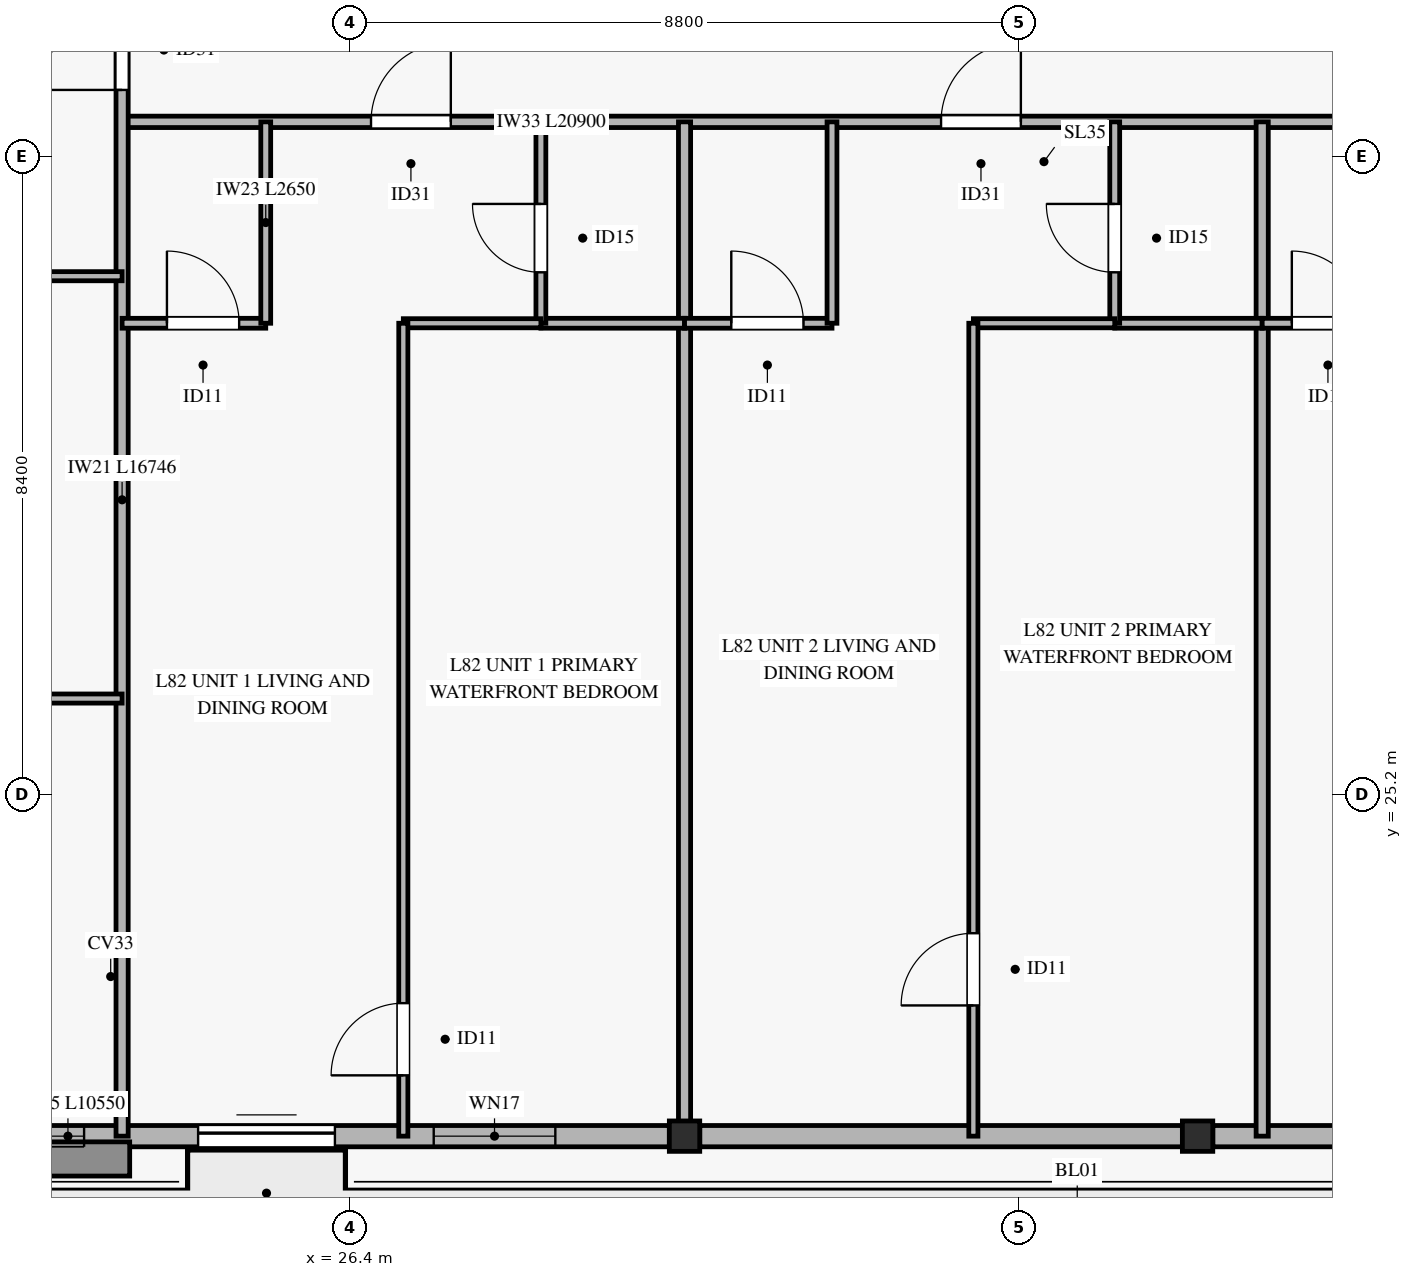
"""IFC4 building model, lengths in metres.
Left out: names, types, materials, properties, quantities, classifications, styles, units other than length and angle.
Written with IfcOpenShell. Run it as: python <this file> out.ifc"""

import sys

from ifc_helpers import new_model, si_unit, direction, frame, frame_2d, origin, origin_2d, place, context, subcontext, project, spatial, rectangle, hollow_rectangle, extrude, source, transform, mapped, element, fill, save


model = new_model("IFC4")
c1 = context("Model", 3, precision=1e-05, world=origin(), true_north=direction((0.0, 1.0)))
c2 = subcontext(c1, "Body", "Model", "MODEL_VIEW")
j1 = project(units=[si_unit("LENGTHUNIT", "METRE"), si_unit("PLANEANGLEUNIT", "RADIAN")], contexts=[c1])
p1 = place(None, origin())
s1 = spatial("IfcSite", under=j1, at=p1, CompositionType="ELEMENT")
p2 = place(p1, origin())
s2 = spatial("IfcBuilding", under=s1, at=p2, CompositionType="ELEMENT")
p3 = place(p2, frame((0.0, 0.0, 317.6)))
s3 = spatial("IfcBuildingStorey", under=s2, at=p3, CompositionType="ELEMENT", Elevation=317.6)
m1 = source(origin(), c2, "Body", "SweptSolid", [
    extrude(hollow_rectangle(XDim=0.4, YDim=0.4, WallThickness=0.02, at=origin_2d()), origin(), (0.0, 0.0, 1.0), 3.185),
])
for number, where, z_axis, x_axis in (
    (1, (30.8, 20.704, 0.0), (0.0, 0.0, 1.0), (1.0, 0.0, 0.0)),
    (2, (37.55, 20.704, 0.0), (0.0, 0.0, 1.0), (1.0, 0.0, 0.0)),
):
    element("IfcColumn", number, at=place(p3, frame(where, z_axis=z_axis, x_axis=x_axis)), inside=s3, PredefinedType="COLUMN", context=c2, shape_type="MappedRepresentation", body=[
        mapped(m1, transform((0.0, 0.0, 0.0), x_axis=(1.0, 0.0, 0.0), y_axis=(0.0, 1.0, 0.0), z_axis=(0.0, 0.0, 1.0), scale=1.0)),
    ])
p4 = place(p3, frame((20.05, 20.704, 0.0), z_axis=(0.0, 0.0, 1.0), x_axis=(1.0, 0.0, 0.0)))
e3 = element("IfcWall", 3, at=p4, inside=s3, PredefinedType="SOLIDWALL", context=c2, shape_type="SweptSolid", body=[
    extrude(rectangle(XDim=10.55, YDim=0.28, at=frame_2d((5.275, 0.0))), origin(), (0.0, 0.0, 1.0), 2.815),
])
p5 = place(p4, frame((4.35, 0.0, 0.0)))
e4 = element("IfcOpeningElement", 4, at=p5, cuts=e3, PredefinedType="OPENING", context=c2, shape_type="SweptSolid", body=[
    extrude(rectangle(XDim=1.8, YDim=2.25, at=frame_2d((0.9, 1.125))), frame((0.0, 0.15, 0.0), z_axis=(0.0, -1.0, 0.0), x_axis=(1.0, 0.0, 0.0)), (0.0, 0.0, 1.0), 0.3),
])
p6 = place(p4, frame((0.65, 0.0, 0.45)))
e5 = element("IfcOpeningElement", 5, at=p6, cuts=e3, PredefinedType="OPENING", context=c2, shape_type="SweptSolid", body=[
    extrude(rectangle(XDim=2.2, YDim=2.1, at=frame_2d((1.1, 1.05))), frame((0.0, 0.15, 0.0), z_axis=(0.0, -1.0, 0.0), x_axis=(1.0, 0.0, 0.0)), (0.0, 0.0, 1.0), 0.3),
])
p7 = place(p4, frame((7.45, 0.0, 0.45)))
e6 = element("IfcOpeningElement", 6, at=p7, cuts=e3, PredefinedType="OPENING", context=c2, shape_type="SweptSolid", body=[
    extrude(rectangle(XDim=1.6, YDim=2.0, at=frame_2d((0.8, 1.0))), frame((0.0, 0.15, 0.0), z_axis=(0.0, -1.0, 0.0), x_axis=(1.0, 0.0, 0.0)), (0.0, 0.0, 1.0), 0.3),
])
for number, where, z_axis, x_axis in (
    (7, (31.0, 20.704, 0.0), (0.0, 0.0, 1.0), (1.0, 0.0, 0.0)),
    (8, (37.75, 20.704, 0.0), (0.0, 0.0, 1.0), (1.0, 0.0, 0.0)),
):
    element("IfcWall", number, at=place(p3, frame(where, z_axis=z_axis, x_axis=x_axis)), inside=s3, PredefinedType="SOLIDWALL", context=c2, shape_type="SweptSolid", body=[
        extrude(rectangle(XDim=6.35, YDim=0.28, at=frame_2d((3.175, 0.0))), origin(), (0.0, 0.0, 1.0), 2.815),
    ])
p8 = place(p3, frame((23.4, 34.05, 0.0), z_axis=(0.0, 0.0, 1.0), x_axis=(1.0, 0.0, 0.0)))
e9 = element("IfcWall", 9, at=p8, inside=s3, PredefinedType="PARTITIONING", context=c2, shape_type="SweptSolid", body=[
    extrude(rectangle(XDim=20.9, YDim=0.15, at=frame_2d((10.45, 0.0))), origin(), (0.0, 0.0, 1.0), 2.47),
])
p9 = place(p8, frame((3.275, 0.0, 0.0)))
e10 = element("IfcOpeningElement", 10, at=p9, cuts=e9, PredefinedType="OPENING", context=c2, shape_type="SweptSolid", body=[
    extrude(rectangle(XDim=1.05, YDim=2.15, at=frame_2d((0.525, 1.075))), frame((0.0, 0.085, 0.0), z_axis=(0.0, -1.0, 0.0), x_axis=(1.0, 0.0, 0.0)), (0.0, 0.0, 1.0), 0.17),
])
p10 = place(p8, frame((10.775, 0.0, 0.0)))
e11 = element("IfcOpeningElement", 11, at=p10, cuts=e9, PredefinedType="OPENING", context=c2, shape_type="SweptSolid", body=[
    extrude(rectangle(XDim=1.05, YDim=2.15, at=frame_2d((0.525, 1.075))), frame((0.0, 0.085, 0.0), z_axis=(0.0, -1.0, 0.0), x_axis=(1.0, 0.0, 0.0)), (0.0, 0.0, 1.0), 0.17),
])
p11 = place(p8, frame((17.525, 0.0, 0.0)))
e12 = element("IfcOpeningElement", 12, at=p11, cuts=e9, PredefinedType="OPENING", context=c2, shape_type="SweptSolid", body=[
    extrude(rectangle(XDim=1.05, YDim=2.15, at=frame_2d((0.525, 1.075))), frame((0.0, 0.085, 0.0), z_axis=(0.0, -1.0, 0.0), x_axis=(1.0, 0.0, 0.0)), (0.0, 0.0, 1.0), 0.17),
])
p12 = place(p3, frame((23.4, 20.704, 0.0), z_axis=(0.0, 0.0, 1.0), x_axis=(0.0, 1.0, 0.0)))
e13 = element("IfcWall", 13, at=p12, inside=s3, PredefinedType="PARTITIONING", context=c2, shape_type="SweptSolid", body=[
    extrude(rectangle(XDim=16.746, YDim=0.16, at=frame_2d((8.373, 0.0))), origin(), (0.0, 0.0, 1.0), 2.77),
])
p13 = place(p12, frame((13.766, 0.0, 0.0)))
e14 = element("IfcOpeningElement", 14, at=p13, cuts=e13, PredefinedType="OPENING", context=c2, shape_type="SweptSolid", body=[
    extrude(rectangle(XDim=1.05, YDim=2.15, at=frame_2d((0.525, 1.075))), frame((0.0, 0.09, 0.0), z_axis=(0.0, -1.0, 0.0), x_axis=(1.0, 0.0, 0.0)), (0.0, 0.0, 1.0), 0.18),
])
p14 = place(p3, frame((30.8, 20.704, 0.0), z_axis=(0.0, 0.0, 1.0), x_axis=(0.0, 1.0, 0.0)))
e15 = element("IfcWall", 15, at=p14, inside=s3, PredefinedType="PARTITIONING", context=c2, shape_type="SweptSolid", body=[
    extrude(rectangle(XDim=13.346, YDim=0.16, at=frame_2d((6.673, 0.0))), origin(), (0.0, 0.0, 1.0), 2.47),
])
p15 = place(p3, frame((38.4, 20.704, 0.0), z_axis=(0.0, 0.0, 1.0), x_axis=(0.0, 1.0, 0.0)))
e16 = element("IfcWall", 16, at=p15, inside=s3, PredefinedType="PARTITIONING", context=c2, shape_type="SweptSolid", body=[
    extrude(rectangle(XDim=13.346, YDim=0.16, at=frame_2d((6.673, 0.0))), origin(), (0.0, 0.0, 1.0), 2.77),
])
p16 = place(p3, frame((10.855, 26.462, 0.0), z_axis=(0.0, 0.0, 1.0), x_axis=(1.0, 0.0, 0.0)))
e17 = element("IfcWall", 17, at=p16, inside=s3, PredefinedType="PARTITIONING", context=c2, shape_type="SweptSolid", body=[
    extrude(rectangle(XDim=12.545, YDim=0.12, at=frame_2d((6.272, 0.0))), origin(), (0.0, 0.0, 1.0), 2.47),
])
p17 = place(p16, frame((5.304, 0.0, 0.0)))
e18 = element("IfcOpeningElement", 18, at=p17, cuts=e17, PredefinedType="OPENING", context=c2, shape_type="SweptSolid", body=[
    extrude(rectangle(XDim=0.95, YDim=2.1, at=frame_2d((0.475, 1.05))), frame((0.0, 0.07, 0.0), z_axis=(0.0, -1.0, 0.0), x_axis=(1.0, 0.0, 0.0)), (0.0, 0.0, 1.0), 0.14),
])
p18 = place(p3, frame((10.855, 32.019, 0.0), z_axis=(0.0, 0.0, 1.0), x_axis=(1.0, 0.0, 0.0)))
e19 = element("IfcWall", 19, at=p18, inside=s3, PredefinedType="PARTITIONING", context=c2, shape_type="SweptSolid", body=[
    extrude(rectangle(XDim=12.545, YDim=0.12, at=frame_2d((6.272, 0.0))), origin(), (0.0, 0.0, 1.0), 2.47),
])
p19 = place(p18, frame((5.304, 0.0, 0.0)))
e20 = element("IfcOpeningElement", 20, at=p19, cuts=e19, PredefinedType="OPENING", context=c2, shape_type="SweptSolid", body=[
    extrude(rectangle(XDim=0.95, YDim=2.1, at=frame_2d((0.475, 1.05))), frame((0.0, 0.07, 0.0), z_axis=(0.0, -1.0, 0.0), x_axis=(1.0, 0.0, 0.0)), (0.0, 0.0, 1.0), 0.14),
])
p20 = place(p3, frame((23.4, 31.4, 0.0), z_axis=(0.0, 0.0, 1.0), x_axis=(1.0, 0.0, 0.0)))
e21 = element("IfcWall", 21, at=p20, inside=s3, PredefinedType="PARTITIONING", context=c2, shape_type="SweptSolid", body=[
    extrude(rectangle(XDim=1.89, YDim=0.13, at=frame_2d((0.945, 0.0))), origin(), (0.0, 0.0, 1.0), 3.185),
])
p21 = place(p20, frame((0.59, 0.0, 0.0)))
e22 = element("IfcOpeningElement", 22, at=p21, cuts=e21, PredefinedType="OPENING", context=c2, shape_type="SweptSolid", body=[
    extrude(rectangle(XDim=0.95, YDim=2.1, at=frame_2d((0.475, 1.05))), frame((0.0, 0.075, 0.0), z_axis=(0.0, -1.0, 0.0), x_axis=(1.0, 0.0, 0.0)), (0.0, 0.0, 1.0), 0.15),
])
p22 = place(p3, frame((25.29, 31.4, 0.0), z_axis=(0.0, 0.0, 1.0), x_axis=(0.0, 1.0, 0.0)))
e23 = element("IfcWall", 23, at=p22, inside=s3, PredefinedType="PARTITIONING", context=c2, shape_type="SweptSolid", body=[
    extrude(rectangle(XDim=2.65, YDim=0.13, at=frame_2d((1.325, 0.0))), origin(), (0.0, 0.0, 1.0), 2.77),
])
p23 = place(p3, frame((28.91, 31.4, 0.0), z_axis=(0.0, 0.0, 1.0), x_axis=(1.0, 0.0, 0.0)))
e24 = element("IfcWall", 24, at=p23, inside=s3, PredefinedType="PARTITIONING", context=c2, shape_type="SweptSolid", body=[
    extrude(rectangle(XDim=1.89, YDim=0.13, at=frame_2d((0.945, 0.0))), origin(), (0.0, 0.0, 1.0), 2.47),
])
p24 = place(p3, frame((28.91, 31.4, 0.0), z_axis=(0.0, 0.0, 1.0), x_axis=(0.0, 1.0, 0.0)))
e25 = element("IfcWall", 25, at=p24, inside=s3, PredefinedType="PARTITIONING", context=c2, shape_type="SweptSolid", body=[
    extrude(rectangle(XDim=2.65, YDim=0.13, at=frame_2d((1.325, 0.0))), origin(), (0.0, 0.0, 1.0), 2.77),
])
p25 = place(p24, frame((0.67, 0.0, 0.0)))
e26 = element("IfcOpeningElement", 26, at=p25, cuts=e25, PredefinedType="OPENING", context=c2, shape_type="SweptSolid", body=[
    extrude(rectangle(XDim=0.9, YDim=2.1, at=frame_2d((0.45, 1.05))), frame((0.0, 0.075, 0.0), z_axis=(0.0, -1.0, 0.0), x_axis=(1.0, 0.0, 0.0)), (0.0, 0.0, 1.0), 0.15),
])
p26 = place(p3, frame((27.1, 31.4, 0.0), z_axis=(0.0, 0.0, 1.0), x_axis=(1.0, 0.0, 0.0)))
e27 = element("IfcWall", 27, at=p26, inside=s3, PredefinedType="PARTITIONING", context=c2, shape_type="SweptSolid", body=[
    extrude(rectangle(XDim=1.81, YDim=0.12, at=frame_2d((0.905, 0.0))), origin(), (0.0, 0.0, 1.0), 3.185),
])
p27 = place(p3, frame((27.1, 20.704, 0.0), z_axis=(0.0, 0.0, 1.0), x_axis=(0.0, 1.0, 0.0)))
e28 = element("IfcWall", 28, at=p27, inside=s3, PredefinedType="PARTITIONING", context=c2, shape_type="SweptSolid", body=[
    extrude(rectangle(XDim=10.696, YDim=0.12, at=frame_2d((5.348, 0.0))), origin(), (0.0, 0.0, 1.0), 2.77),
])
p28 = place(p27, frame((0.8, 0.0, 0.0)))
e29 = element("IfcOpeningElement", 29, at=p28, cuts=e28, PredefinedType="OPENING", context=c2, shape_type="SweptSolid", body=[
    extrude(rectangle(XDim=0.95, YDim=2.1, at=frame_2d((0.475, 1.05))), frame((0.0, 0.07, 0.0), z_axis=(0.0, -1.0, 0.0), x_axis=(1.0, 0.0, 0.0)), (0.0, 0.0, 1.0), 0.14),
])
p29 = place(p3, frame((30.8, 31.4, 0.0), z_axis=(0.0, 0.0, 1.0), x_axis=(1.0, 0.0, 0.0)))
e30 = element("IfcWall", 30, at=p29, inside=s3, PredefinedType="PARTITIONING", context=c2, shape_type="SweptSolid", body=[
    extrude(rectangle(XDim=1.94, YDim=0.13, at=frame_2d((0.97, 0.0))), origin(), (0.0, 0.0, 1.0), 2.47),
])
p30 = place(p29, frame((0.615, 0.0, 0.0)))
e31 = element("IfcOpeningElement", 31, at=p30, cuts=e30, PredefinedType="OPENING", context=c2, shape_type="SweptSolid", body=[
    extrude(rectangle(XDim=0.95, YDim=2.1, at=frame_2d((0.475, 1.05))), frame((0.0, 0.075, 0.0), z_axis=(0.0, -1.0, 0.0), x_axis=(1.0, 0.0, 0.0)), (0.0, 0.0, 1.0), 0.15),
])
p31 = place(p3, frame((32.74, 31.4, 0.0), z_axis=(0.0, 0.0, 1.0), x_axis=(0.0, 1.0, 0.0)))
e32 = element("IfcWall", 32, at=p31, inside=s3, PredefinedType="PARTITIONING", context=c2, shape_type="SweptSolid", body=[
    extrude(rectangle(XDim=2.65, YDim=0.13, at=frame_2d((1.325, 0.0))), origin(), (0.0, 0.0, 1.0), 2.77),
])
p32 = place(p3, frame((36.46, 31.4, 0.0), z_axis=(0.0, 0.0, 1.0), x_axis=(1.0, 0.0, 0.0)))
e33 = element("IfcWall", 33, at=p32, inside=s3, PredefinedType="PARTITIONING", context=c2, shape_type="SweptSolid", body=[
    extrude(rectangle(XDim=1.94, YDim=0.13, at=frame_2d((0.97, 0.0))), origin(), (0.0, 0.0, 1.0), 2.47),
])
p33 = place(p3, frame((36.46, 31.4, 0.0), z_axis=(0.0, 0.0, 1.0), x_axis=(0.0, 1.0, 0.0)))
e34 = element("IfcWall", 34, at=p33, inside=s3, PredefinedType="PARTITIONING", context=c2, shape_type="SweptSolid", body=[
    extrude(rectangle(XDim=2.65, YDim=0.13, at=frame_2d((1.325, 0.0))), origin(), (0.0, 0.0, 1.0), 2.77),
])
p34 = place(p33, frame((0.67, 0.0, 0.0)))
e35 = element("IfcOpeningElement", 35, at=p34, cuts=e34, PredefinedType="OPENING", context=c2, shape_type="SweptSolid", body=[
    extrude(rectangle(XDim=0.9, YDim=2.1, at=frame_2d((0.45, 1.05))), frame((0.0, 0.075, 0.0), z_axis=(0.0, -1.0, 0.0), x_axis=(1.0, 0.0, 0.0)), (0.0, 0.0, 1.0), 0.15),
])
p35 = place(p3, frame((34.6, 31.4, 0.0), z_axis=(0.0, 0.0, 1.0), x_axis=(1.0, 0.0, 0.0)))
e36 = element("IfcWall", 36, at=p35, inside=s3, PredefinedType="PARTITIONING", context=c2, shape_type="SweptSolid", body=[
    extrude(rectangle(XDim=1.86, YDim=0.12, at=frame_2d((0.93, 0.0))), origin(), (0.0, 0.0, 1.0), 3.185),
])
p36 = place(p3, frame((34.6, 20.704, 0.0), z_axis=(0.0, 0.0, 1.0), x_axis=(0.0, 1.0, 0.0)))
e37 = element("IfcWall", 37, at=p36, inside=s3, PredefinedType="PARTITIONING", context=c2, shape_type="SweptSolid", body=[
    extrude(rectangle(XDim=10.696, YDim=0.12, at=frame_2d((5.348, 0.0))), origin(), (0.0, 0.0, 1.0), 2.77),
])
p37 = place(p36, frame((1.72, 0.0, 0.0)))
e38 = element("IfcOpeningElement", 38, at=p37, cuts=e37, PredefinedType="OPENING", context=c2, shape_type="SweptSolid", body=[
    extrude(rectangle(XDim=0.95, YDim=2.1, at=frame_2d((0.475, 1.05))), frame((0.0, 0.07, 0.0), z_axis=(0.0, -1.0, 0.0), x_axis=(1.0, 0.0, 0.0)), (0.0, 0.0, 1.0), 0.14),
])
p38 = place(p3, frame((38.4, 31.4, 0.0), z_axis=(0.0, 0.0, 1.0), x_axis=(1.0, 0.0, 0.0)))
e39 = element("IfcWall", 39, at=p38, inside=s3, PredefinedType="PARTITIONING", context=c2, shape_type="SweptSolid", body=[
    extrude(rectangle(XDim=1.58, YDim=0.13, at=frame_2d((0.79, 0.0))), origin(), (0.0, 0.0, 1.0), 3.185),
])
p39 = place(p38, frame((0.39, 0.0, 0.0)))
e40 = element("IfcOpeningElement", 40, at=p39, cuts=e39, PredefinedType="OPENING", context=c2, shape_type="SweptSolid", body=[
    extrude(rectangle(XDim=0.95, YDim=2.1, at=frame_2d((0.475, 1.05))), frame((0.0, 0.075, 0.0), z_axis=(0.0, -1.0, 0.0), x_axis=(1.0, 0.0, 0.0)), (0.0, 0.0, 1.0), 0.15),
])
m2 = source(origin(), c2, "Body", "SweptSolid", [
    extrude(rectangle(XDim=1.8, YDim=2.25, at=frame_2d((0.9, 1.125))), frame((0.0, 0.025, 0.0), z_axis=(0.0, -1.0, 0.0), x_axis=(1.0, 0.0, 0.0)), (0.0, 0.0, 1.0), 0.05),
])
p40 = place(p5, origin())
e41 = element("IfcDoor", 41, at=p40, inside=s3, OperationType="SLIDING_TO_LEFT", PredefinedType="DOOR", context=c2, shape_type="MappedRepresentation", body=[
    mapped(m2, transform((0.0, 0.0, 0.0), x_axis=(1.0, 0.0, 0.0), y_axis=(0.0, 1.0, 0.0), z_axis=(0.0, 0.0, 1.0), scale=1.0)),
])
fill(e4, e41)
m3 = source(origin(), c2, "Body", "SweptSolid", [
    extrude(rectangle(XDim=2.2, YDim=2.1, at=frame_2d((1.1, 1.05))), frame((0.0, 0.03, 0.0), z_axis=(0.0, -1.0, 0.0), x_axis=(1.0, 0.0, 0.0)), (0.0, 0.0, 1.0), 0.06),
])
p41 = place(p6, origin())
e42 = element("IfcWindow", 42, at=p41, inside=s3, PartitioningType="SINGLE_PANEL", PredefinedType="WINDOW", context=c2, shape_type="MappedRepresentation", body=[
    mapped(m3, transform((0.0, 0.0, 0.0), x_axis=(1.0, 0.0, 0.0), y_axis=(0.0, 1.0, 0.0), z_axis=(0.0, 0.0, 1.0), scale=1.0)),
])
fill(e5, e42)
m4 = source(origin(), c2, "Body", "SweptSolid", [
    extrude(rectangle(XDim=1.6, YDim=2.0, at=frame_2d((0.8, 1.0))), frame((0.0, 0.03, 0.0), z_axis=(0.0, -1.0, 0.0), x_axis=(1.0, 0.0, 0.0)), (0.0, 0.0, 1.0), 0.06),
])
p42 = place(p7, origin())
e43 = element("IfcWindow", 43, at=p42, inside=s3, PartitioningType="SINGLE_PANEL", PredefinedType="WINDOW", context=c2, shape_type="MappedRepresentation", body=[
    mapped(m4, transform((0.0, 0.0, 0.0), x_axis=(1.0, 0.0, 0.0), y_axis=(0.0, 1.0, 0.0), z_axis=(0.0, 0.0, 1.0), scale=1.0)),
])
fill(e6, e43)
m5 = source(origin(), c2, "Body", "SweptSolid", [
    extrude(rectangle(XDim=1.05, YDim=2.15, at=frame_2d((0.525, 1.075))), frame((0.0, 0.025, 0.0), z_axis=(0.0, -1.0, 0.0), x_axis=(1.0, 0.0, 0.0)), (0.0, 0.0, 1.0), 0.05),
])
p43 = place(p13, origin())
e44 = element("IfcDoor", 44, at=p43, inside=s3, OperationType="SINGLE_SWING_LEFT", PredefinedType="DOOR", context=c2, shape_type="MappedRepresentation", body=[
    mapped(m5, transform((0.0, 0.0, 0.0), x_axis=(1.0, 0.0, 0.0), y_axis=(0.0, 1.0, 0.0), z_axis=(0.0, 0.0, 1.0), scale=1.0)),
])
fill(e14, e44)
p44 = place(p9, origin())
e45 = element("IfcDoor", 45, at=p44, inside=s3, OperationType="SINGLE_SWING_RIGHT", PredefinedType="DOOR", context=c2, shape_type="MappedRepresentation", body=[
    mapped(m5, transform((0.0, 0.0, 0.0), x_axis=(1.0, 0.0, 0.0), y_axis=(0.0, 1.0, 0.0), z_axis=(0.0, 0.0, 1.0), scale=1.0)),
])
fill(e10, e45)
m6 = source(origin(), c2, "Body", "SweptSolid", [
    extrude(rectangle(XDim=0.95, YDim=2.1, at=frame_2d((0.475, 1.05))), frame((0.0, 0.025, 0.0), z_axis=(0.0, -1.0, 0.0), x_axis=(1.0, 0.0, 0.0)), (0.0, 0.0, 1.0), 0.05),
])
p45 = place(p21, origin())
e46 = element("IfcDoor", 46, at=p45, inside=s3, OperationType="SINGLE_SWING_LEFT", PredefinedType="DOOR", context=c2, shape_type="MappedRepresentation", body=[
    mapped(m6, transform((0.0, 0.0, 0.0), x_axis=(1.0, 0.0, 0.0), y_axis=(0.0, 1.0, 0.0), z_axis=(0.0, 0.0, 1.0), scale=1.0)),
])
fill(e22, e46)
m7 = source(origin(), c2, "Body", "SweptSolid", [
    extrude(rectangle(XDim=0.9, YDim=2.1, at=frame_2d((0.45, 1.05))), frame((0.0, 0.025, 0.0), z_axis=(0.0, -1.0, 0.0), x_axis=(1.0, 0.0, 0.0)), (0.0, 0.0, 1.0), 0.05),
])
p46 = place(p25, origin())
e47 = element("IfcDoor", 47, at=p46, inside=s3, OperationType="SINGLE_SWING_RIGHT", PredefinedType="DOOR", context=c2, shape_type="MappedRepresentation", body=[
    mapped(m7, transform((0.0, 0.0, 0.0), x_axis=(1.0, 0.0, 0.0), y_axis=(0.0, 1.0, 0.0), z_axis=(0.0, 0.0, 1.0), scale=1.0)),
])
fill(e26, e47)
p47 = place(p28, origin())
e48 = element("IfcDoor", 48, at=p47, inside=s3, OperationType="SINGLE_SWING_LEFT", PredefinedType="DOOR", context=c2, shape_type="MappedRepresentation", body=[
    mapped(m6, transform((0.0, 0.0, 0.0), x_axis=(1.0, 0.0, 0.0), y_axis=(0.0, 1.0, 0.0), z_axis=(0.0, 0.0, 1.0), scale=1.0)),
])
fill(e29, e48)
p48 = place(p10, origin())
e49 = element("IfcDoor", 49, at=p48, inside=s3, OperationType="SINGLE_SWING_RIGHT", PredefinedType="DOOR", context=c2, shape_type="MappedRepresentation", body=[
    mapped(m5, transform((0.0, 0.0, 0.0), x_axis=(1.0, 0.0, 0.0), y_axis=(0.0, 1.0, 0.0), z_axis=(0.0, 0.0, 1.0), scale=1.0)),
])
fill(e11, e49)
p49 = place(p30, origin())
e50 = element("IfcDoor", 50, at=p49, inside=s3, OperationType="SINGLE_SWING_LEFT", PredefinedType="DOOR", context=c2, shape_type="MappedRepresentation", body=[
    mapped(m6, transform((0.0, 0.0, 0.0), x_axis=(1.0, 0.0, 0.0), y_axis=(0.0, 1.0, 0.0), z_axis=(0.0, 0.0, 1.0), scale=1.0)),
])
fill(e31, e50)
p50 = place(p34, origin())
e51 = element("IfcDoor", 51, at=p50, inside=s3, OperationType="SINGLE_SWING_RIGHT", PredefinedType="DOOR", context=c2, shape_type="MappedRepresentation", body=[
    mapped(m7, transform((0.0, 0.0, 0.0), x_axis=(1.0, 0.0, 0.0), y_axis=(0.0, 1.0, 0.0), z_axis=(0.0, 0.0, 1.0), scale=1.0)),
])
fill(e35, e51)
p51 = place(p37, origin())
e52 = element("IfcDoor", 52, at=p51, inside=s3, OperationType="SINGLE_SWING_LEFT", PredefinedType="DOOR", context=c2, shape_type="MappedRepresentation", body=[
    mapped(m6, transform((0.0, 0.0, 0.0), x_axis=(1.0, 0.0, 0.0), y_axis=(0.0, 1.0, 0.0), z_axis=(0.0, 0.0, 1.0), scale=1.0)),
])
fill(e38, e52)
p52 = place(p39, origin())
e53 = element("IfcDoor", 53, at=p52, inside=s3, OperationType="SINGLE_SWING_LEFT", PredefinedType="DOOR", context=c2, shape_type="MappedRepresentation", body=[
    mapped(m6, transform((0.0, 0.0, 0.0), x_axis=(1.0, 0.0, 0.0), y_axis=(0.0, 1.0, 0.0), z_axis=(0.0, 0.0, 1.0), scale=1.0)),
])
fill(e40, e53)
save(model, sys.argv[1])
